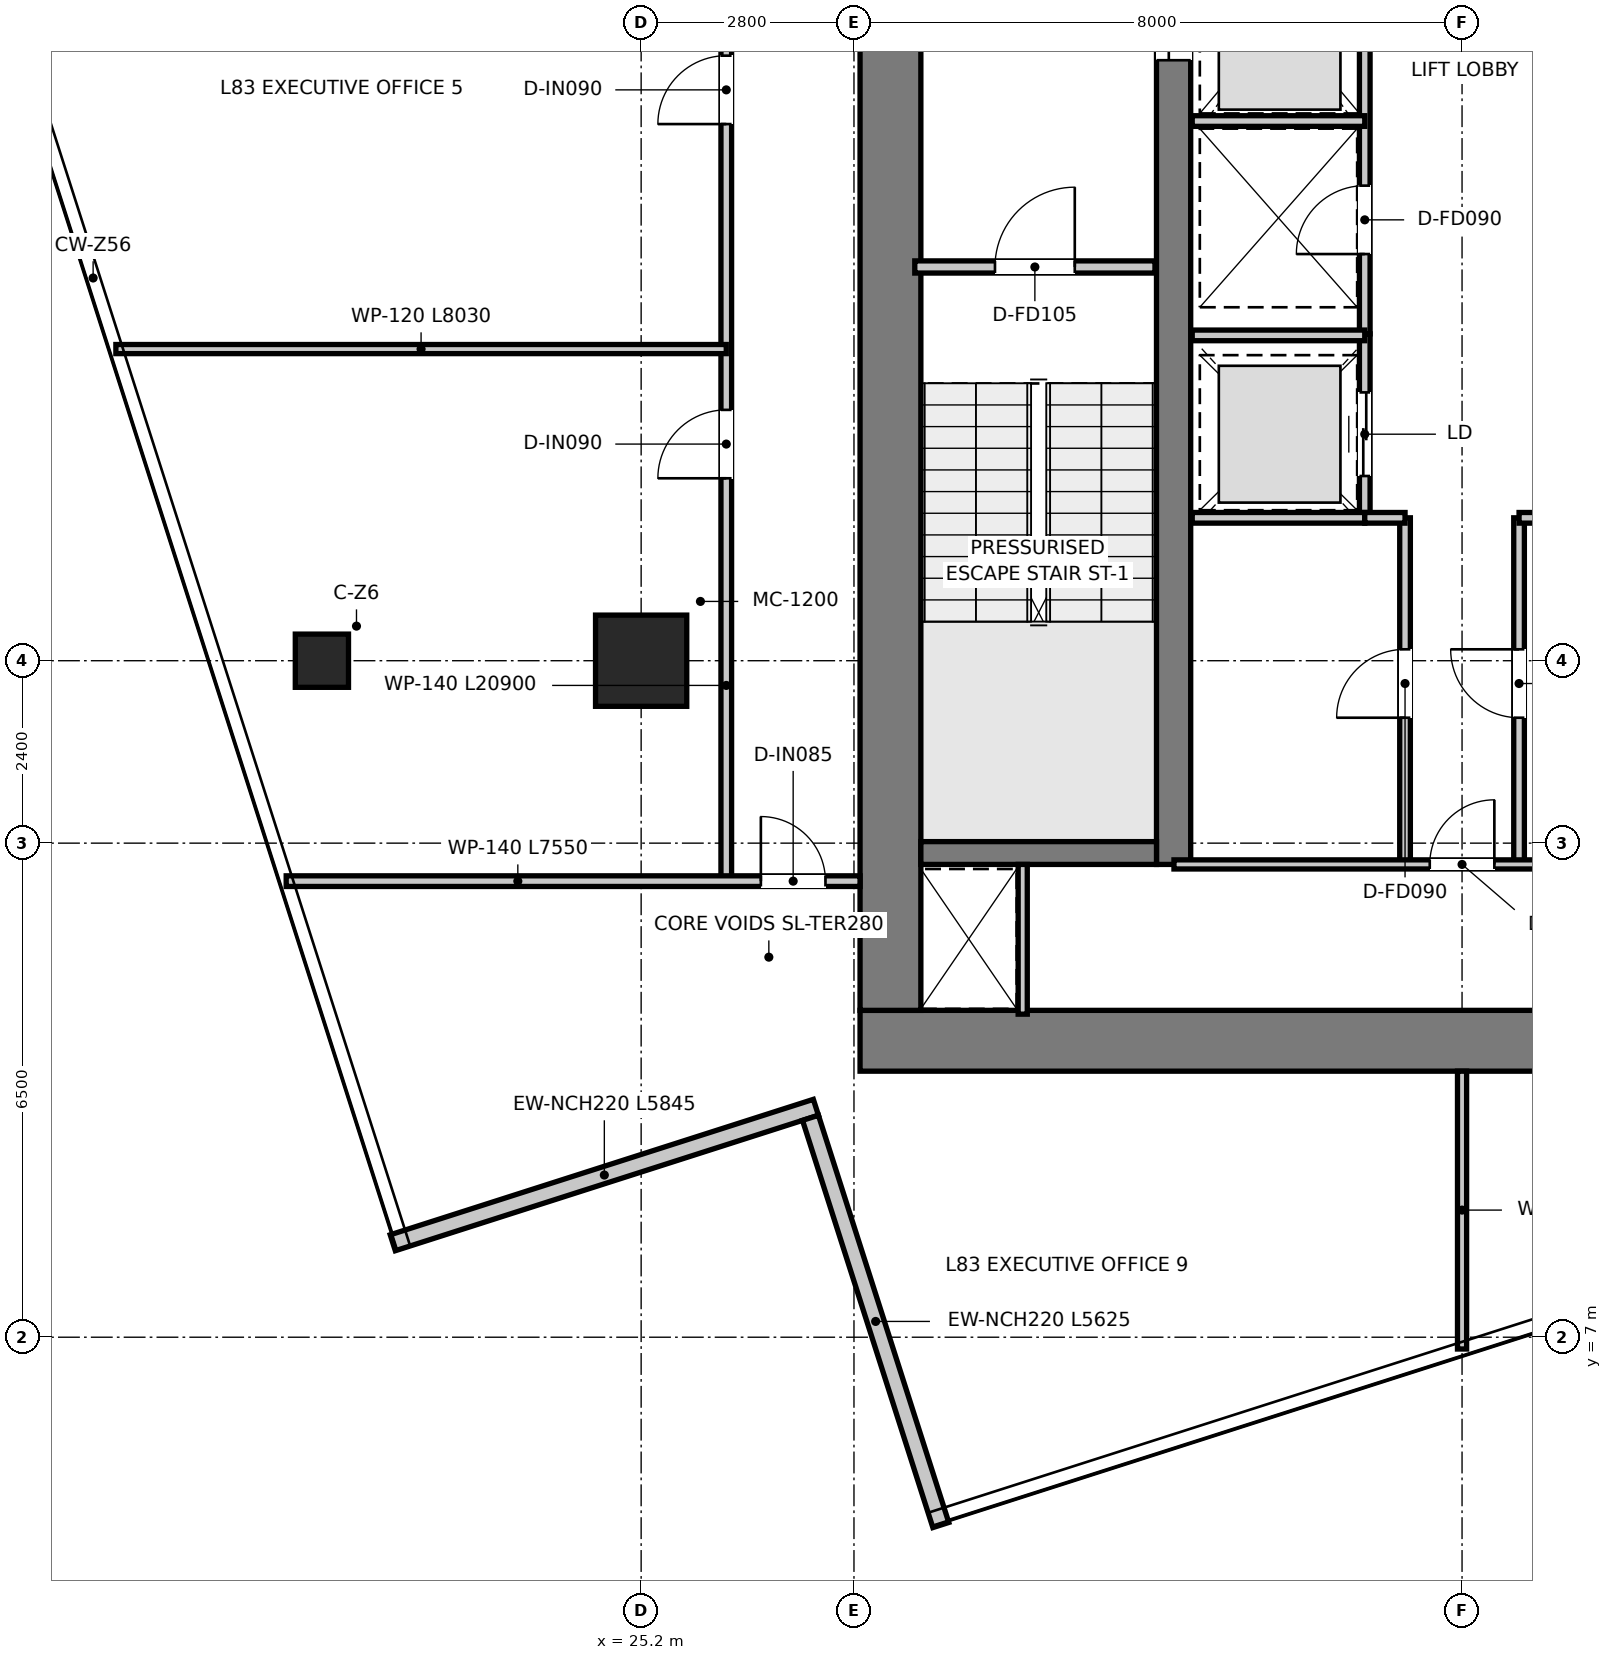
"""IFC4 building model, lengths in metres.
Left out: names, types, materials, properties, quantities, classifications, styles, units other than length and angle.
Written with IfcOpenShell. Run it as: python <this file> out.ifc"""

import sys

from ifc_helpers import new_model, si_unit, direction, frame, frame_2d, origin, origin_2d, place, context, subcontext, project, spatial, rectangle, extrude, source, transform, mapped, element, fill, save


model = new_model("IFC4")
c1 = context("Model", 3, precision=1e-05, world=origin(), true_north=direction((0.0, 1.0)))
c2 = subcontext(c1, "Body", "Model", "MODEL_VIEW")
j1 = project(units=[si_unit("LENGTHUNIT", "METRE"), si_unit("PLANEANGLEUNIT", "RADIAN")], contexts=[c1])
p1 = place(None, origin())
s1 = spatial("IfcSite", under=j1, at=p1, CompositionType="ELEMENT")
p2 = place(p1, origin())
s2 = spatial("IfcBuilding", under=s1, at=p2, CompositionType="ELEMENT")
p3 = place(p2, frame((0.0, 0.0, 339.55)))
s3 = spatial("IfcBuildingStorey", under=s2, at=p3, CompositionType="ELEMENT", Elevation=339.55)
p4 = place(p3, frame((28.08, 10.9, 0.0), z_axis=(0.0, 0.0, 1.0), x_axis=(1.0, 0.0, 0.0)))
e1 = element("IfcWall", 1, at=p4, inside=s3, PredefinedType="SHEAR", context=c2, shape_type="SweptSolid", body=[
    extrude(rectangle(XDim=15.84, YDim=0.8, at=frame_2d((7.92, 0.0))), origin(), (0.0, 0.0, 1.0), 3.95),
])
p5 = place(p3, frame((28.48, 11.3, 0.0), z_axis=(0.0, 0.0, 1.0), x_axis=(0.0, 1.0, 0.0)))
e2 = element("IfcWall", 2, at=p5, inside=s3, PredefinedType="SHEAR", context=c2, shape_type="SweptSolid", body=[
    extrude(rectangle(XDim=14.7, YDim=0.8, at=frame_2d((7.35, 0.0))), origin(), (0.0, 0.0, 1.0), 3.95),
])
p6 = place(p3, frame((32.205, 13.22, 0.0), z_axis=(0.0, 0.0, 1.0), x_axis=(0.0, 1.0, 0.0)))
e3 = element("IfcWall", 3, at=p6, inside=s3, PredefinedType="SHEAR", context=c2, shape_type="SweptSolid", body=[
    extrude(rectangle(XDim=12.78, YDim=0.45, at=frame_2d((6.39, 0.0))), origin(), (0.0, 0.0, 1.0), 3.95),
])
p7 = place(p6, frame((10.58, 0.0, 0.0)))
e4 = element("IfcOpeningElement", 4, at=p7, cuts=e3, PredefinedType="OPENING", context=c2, shape_type="SweptSolid", body=[
    extrude(rectangle(XDim=1.1, YDim=2.15, at=frame_2d((0.55, 1.075))), frame((0.0, 0.235, 0.0), z_axis=(0.0, -1.0, 0.0), x_axis=(1.0, 0.0, 0.0)), (0.0, 0.0, 1.0), 0.47),
])
p8 = place(p3, frame((28.88, 13.37, 0.0), z_axis=(0.0, 0.0, 1.0), x_axis=(1.0, 0.0, 0.0)))
e5 = element("IfcWall", 5, at=p8, inside=s3, PredefinedType="SHEAR", context=c2, shape_type="SweptSolid", body=[
    extrude(rectangle(XDim=3.1, YDim=0.3, at=frame_2d((1.55, 0.0))), origin(), (0.0, 0.0, 1.0), 3.95),
])
m1 = source(origin(), c2, "Body", "SweptSolid", [
    extrude(rectangle(XDim=1.2, YDim=1.2, at=origin_2d()), origin(), (0.0, 0.0, 1.0), 3.95),
])
p9 = place(p3, frame((25.2, 15.9, 0.0), z_axis=(0.0, 0.0, 1.0), x_axis=(1.0, 0.0, 0.0)))
e6 = element("IfcColumn", 6, at=p9, inside=s3, PredefinedType="USERDEFINED", context=c2, shape_type="MappedRepresentation", body=[
    mapped(m1, transform((0.0, 0.0, 0.0), x_axis=(1.0, 0.0, 0.0), y_axis=(0.0, 1.0, 0.0), z_axis=(0.0, 0.0, 1.0), scale=1.0)),
])
m2 = source(origin(), c2, "Body", "SweptSolid", [
    extrude(rectangle(XDim=0.7, YDim=0.7, at=origin_2d()), origin(), (0.0, 0.0, 1.0), 3.95),
])
p10 = place(p3, frame((21.0, 15.9, 0.0), z_axis=(0.0, 0.0, 1.0), x_axis=(1.0, 0.0, 0.0)))
e7 = element("IfcColumn", 7, at=p10, inside=s3, PredefinedType="COLUMN", context=c2, shape_type="MappedRepresentation", body=[
    mapped(m2, transform((0.0, 0.0, 0.0), x_axis=(1.0, 0.0, 0.0), y_axis=(0.0, 1.0, 0.0), z_axis=(0.0, 0.0, 1.0), scale=1.0)),
])
p11 = place(p3, frame((21.932, 8.243, 0.0), z_axis=(0.0, 0.0, 1.0), x_axis=(0.952391647481, 0.304877270074, 0.0)))
e8 = element("IfcWall", 8, at=p11, inside=s3, PredefinedType="ELEMENTEDWALL", context=c2, shape_type="SweptSolid", body=[
    extrude(rectangle(XDim=5.845, YDim=0.22, at=frame_2d((2.922, 0.0))), origin(), (0.0, 0.0, 1.0), 3.67),
])
p12 = place(p3, frame((27.428, 9.886, 0.0), z_axis=(0.0, 0.0, 1.0), x_axis=(0.304903286447, -0.952383318792, 0.0)))
e9 = element("IfcWall", 9, at=p12, inside=s3, PredefinedType="ELEMENTEDWALL", context=c2, shape_type="SweptSolid", body=[
    extrude(rectangle(XDim=5.625, YDim=0.22, at=frame_2d((2.812, 0.0))), origin(), (0.0, 0.0, 1.0), 3.67),
])
p13 = place(p3, frame((28.8, 21.08, 0.0), z_axis=(0.0, 0.0, 1.0), x_axis=(1.0, 0.0, 0.0)))
e10 = element("IfcWall", 10, at=p13, inside=s3, PredefinedType="PARTITIONING", context=c2, shape_type="SweptSolid", body=[
    extrude(rectangle(XDim=3.16, YDim=0.16, at=frame_2d((1.58, 0.0))), origin(), (0.0, 0.0, 1.0), 3.67),
])
p14 = place(p13, frame((1.055, 0.0, 0.0)))
e11 = element("IfcOpeningElement", 11, at=p14, cuts=e10, PredefinedType="OPENING", context=c2, shape_type="SweptSolid", body=[
    extrude(rectangle(XDim=1.05, YDim=2.1, at=frame_2d((0.525, 1.05))), frame((0.0, 0.09, 0.0), z_axis=(0.0, -1.0, 0.0), x_axis=(1.0, 0.0, 0.0)), (0.0, 0.0, 1.0), 0.18),
])
p15 = place(p3, frame((34.72, 20.2, 0.0), z_axis=(0.0, 0.0, 1.0), x_axis=(0.0, 1.0, 0.0)))
e12 = element("IfcWall", 12, at=p15, inside=s3, PredefinedType="PARTITIONING", context=c2, shape_type="SweptSolid", body=[
    extrude(rectangle(XDim=5.78, YDim=0.14, at=frame_2d((2.89, 0.0))), origin(), (0.0, 0.0, 1.0), 2.82),
])
p16 = place(p15, frame((1.05, 0.0, 0.0)))
e13 = element("IfcOpeningElement", 13, at=p16, cuts=e12, PredefinedType="OPENING", context=c2, shape_type="SweptSolid", body=[
    extrude(rectangle(XDim=0.9, YDim=2.1, at=frame_2d((0.45, 1.05))), frame((0.0, 0.08, 0.0), z_axis=(0.0, -1.0, 0.0), x_axis=(1.0, 0.0, 0.0)), (0.0, 0.0, 1.0), 0.16),
])
p17 = place(p3, frame((32.45, 23.0, 0.0), z_axis=(0.0, 0.0, 1.0), x_axis=(1.0, 0.0, 0.0)))
e14 = element("IfcWall", 14, at=p17, inside=s3, PredefinedType="PARTITIONING", context=c2, shape_type="SweptSolid", body=[
    extrude(rectangle(XDim=2.27, YDim=0.14, at=frame_2d((1.135, 0.0))), origin(), (0.0, 0.0, 1.0), 2.82),
])
p18 = place(p3, frame((34.72, 17.78, 0.0), z_axis=(0.0, 0.0, 1.0), x_axis=(0.0, 1.0, 0.0)))
e15 = element("IfcWall", 15, at=p18, inside=s3, PredefinedType="PARTITIONING", context=c2, shape_type="SweptSolid", body=[
    extrude(rectangle(XDim=2.42, YDim=0.14, at=frame_2d((1.21, 0.0))), origin(), (0.0, 0.0, 1.0), 3.67),
])
p19 = place(p18, frame((0.55, 0.0, 0.0)))
e16 = element("IfcOpeningElement", 16, at=p19, cuts=e15, PredefinedType="OPENING", context=c2, shape_type="SweptSolid", body=[
    extrude(rectangle(XDim=1.1, YDim=2.15, at=frame_2d((0.55, 1.075))), frame((0.0, 0.08, 0.0), z_axis=(0.0, -1.0, 0.0), x_axis=(1.0, 0.0, 0.0)), (0.0, 0.0, 1.0), 0.16),
])
for number, where, z_axis, x_axis in (
    (17, (32.45, 17.78, 0.0), (0.0, 0.0, 1.0), (1.0, 0.0, 0.0)),
    (18, (32.45, 20.18, 0.0), (0.0, 0.0, 1.0), (1.0, 0.0, 0.0)),
):
    element("IfcWall", number, at=place(p3, frame(where, z_axis=z_axis, x_axis=x_axis)), inside=s3, PredefinedType="PARTITIONING", context=c2, shape_type="SweptSolid", body=[
        extrude(rectangle(XDim=2.27, YDim=0.14, at=frame_2d((1.135, 0.0))), origin(), (0.0, 0.0, 1.0), 3.67),
    ])
p20 = place(p3, frame((35.25, 13.22, 0.0), z_axis=(0.0, 0.0, 1.0), x_axis=(0.0, 1.0, 0.0)))
e19 = element("IfcWall", 19, at=p20, inside=s3, PredefinedType="PARTITIONING", context=c2, shape_type="SweptSolid", body=[
    extrude(rectangle(XDim=4.56, YDim=0.14, at=frame_2d((2.28, 0.0))), origin(), (0.0, 0.0, 1.0), 3.67),
])
p21 = place(p20, frame((1.93, 0.0, 0.0)))
e20 = element("IfcOpeningElement", 20, at=p21, cuts=e19, PredefinedType="OPENING", context=c2, shape_type="SweptSolid", body=[
    extrude(rectangle(XDim=0.9, YDim=2.1, at=frame_2d((0.45, 1.05))), frame((0.0, 0.08, 0.0), z_axis=(0.0, -1.0, 0.0), x_axis=(1.0, 0.0, 0.0)), (0.0, 0.0, 1.0), 0.16),
])
p22 = place(p3, frame((34.72, 17.78, 0.0), z_axis=(0.0, 0.0, 1.0), x_axis=(1.0, 0.0, 0.0)))
e21 = element("IfcWall", 21, at=p22, inside=s3, PredefinedType="PARTITIONING", context=c2, shape_type="SweptSolid", body=[
    extrude(rectangle(XDim=0.53, YDim=0.14, at=frame_2d((0.265, 0.0))), origin(), (0.0, 0.0, 1.0), 3.67),
])
p23 = place(p3, frame((36.75, 13.22, 0.0), z_axis=(0.0, 0.0, 1.0), x_axis=(0.0, 1.0, 0.0)))
e22 = element("IfcWall", 22, at=p23, inside=s3, PredefinedType="PARTITIONING", context=c2, shape_type="SweptSolid", body=[
    extrude(rectangle(XDim=4.56, YDim=0.14, at=frame_2d((2.28, 0.0))), origin(), (0.0, 0.0, 1.0), 3.67),
])
p24 = place(p23, frame((1.93, 0.0, 0.0)))
e23 = element("IfcOpeningElement", 23, at=p24, cuts=e22, PredefinedType="OPENING", context=c2, shape_type="SweptSolid", body=[
    extrude(rectangle(XDim=0.9, YDim=2.1, at=frame_2d((0.45, 1.05))), frame((0.0, 0.08, 0.0), z_axis=(0.0, -1.0, 0.0), x_axis=(1.0, 0.0, 0.0)), (0.0, 0.0, 1.0), 0.16),
])
p25 = place(p3, frame((36.75, 17.78, 0.0), z_axis=(0.0, 0.0, 1.0), x_axis=(1.0, 0.0, 0.0)))
e24 = element("IfcWall", 24, at=p25, inside=s3, PredefinedType="PARTITIONING", context=c2, shape_type="SweptSolid", body=[
    extrude(rectangle(XDim=0.53, YDim=0.14, at=frame_2d((0.265, 0.0))), origin(), (0.0, 0.0, 1.0), 3.67),
])
p26 = place(p3, frame((30.22, 11.25, 0.0), z_axis=(0.0, 0.0, 1.0), x_axis=(0.0, 1.0, 0.0)))
e25 = element("IfcWall", 25, at=p26, inside=s3, PredefinedType="PARTITIONING", context=c2, shape_type="SweptSolid", body=[
    extrude(rectangle(XDim=1.97, YDim=0.12, at=frame_2d((0.985, 0.0))), origin(), (0.0, 0.0, 1.0), 3.67),
])
p27 = place(p3, frame((32.21, 13.22, 0.0), z_axis=(0.0, 0.0, 1.0), x_axis=(1.0, 0.0, 0.0)))
e26 = element("IfcWall", 26, at=p27, inside=s3, PredefinedType="PARTITIONING", context=c2, shape_type="SweptSolid", body=[
    extrude(rectangle(XDim=7.58, YDim=0.12, at=frame_2d((3.79, 0.0))), origin(), (0.0, 0.0, 1.0), 3.67),
])
p28 = place(p27, frame((3.365, 0.0, 0.0)))
e27 = element("IfcOpeningElement", 27, at=p28, cuts=e26, PredefinedType="OPENING", context=c2, shape_type="SweptSolid", body=[
    extrude(rectangle(XDim=0.85, YDim=2.1, at=frame_2d((0.425, 1.05))), frame((0.0, 0.07, 0.0), z_axis=(0.0, -1.0, 0.0), x_axis=(1.0, 0.0, 0.0)), (0.0, 0.0, 1.0), 0.14),
])
p29 = place(p3, frame((26.32, 13.0, 0.0), z_axis=(0.0, 0.0, 1.0), x_axis=(0.0, 1.0, 0.0)))
e28 = element("IfcWall", 28, at=p29, inside=s3, PredefinedType="PARTITIONING", context=c2, shape_type="SweptSolid", body=[
    extrude(rectangle(XDim=15.66, YDim=0.14, at=frame_2d((7.83, 0.0))), origin(), (0.0, 0.0, 1.0), 3.13),
])
p30 = place(p29, frame((14.3, 0.0, 0.0)))
e29 = element("IfcOpeningElement", 29, at=p30, cuts=e28, PredefinedType="OPENING", context=c2, shape_type="SweptSolid", body=[
    extrude(rectangle(XDim=0.9, YDim=2.1, at=frame_2d((0.45, 1.05))), frame((0.0, 0.08, 0.0), z_axis=(0.0, -1.0, 0.0), x_axis=(1.0, 0.0, 0.0)), (0.0, 0.0, 1.0), 0.16),
])
p31 = place(p29, frame((5.3, 0.0, 0.0)))
e30 = element("IfcOpeningElement", 30, at=p31, cuts=e28, PredefinedType="OPENING", context=c2, shape_type="SweptSolid", body=[
    extrude(rectangle(XDim=0.9, YDim=2.1, at=frame_2d((0.45, 1.05))), frame((0.0, 0.08, 0.0), z_axis=(0.0, -1.0, 0.0), x_axis=(1.0, 0.0, 0.0)), (0.0, 0.0, 1.0), 0.16),
])
p32 = place(p29, frame((9.96, 0.0, 0.0)))
e31 = element("IfcOpeningElement", 31, at=p32, cuts=e28, PredefinedType="OPENING", context=c2, shape_type="SweptSolid", body=[
    extrude(rectangle(XDim=0.9, YDim=2.1, at=frame_2d((0.45, 1.05))), frame((0.0, 0.08, 0.0), z_axis=(0.0, -1.0, 0.0), x_axis=(1.0, 0.0, 0.0)), (0.0, 0.0, 1.0), 0.16),
])
p33 = place(p3, frame((20.53, 13.0, 0.0), z_axis=(0.0, 0.0, 1.0), x_axis=(1.0, 0.0, 0.0)))
e32 = element("IfcWall", 32, at=p33, inside=s3, PredefinedType="PARTITIONING", context=c2, shape_type="SweptSolid", body=[
    extrude(rectangle(XDim=7.55, YDim=0.14, at=frame_2d((3.775, 0.0))), origin(), (0.0, 0.0, 1.0), 3.18),
])
p34 = place(p33, frame((6.245, 0.0, 0.0)))
e33 = element("IfcOpeningElement", 33, at=p34, cuts=e32, PredefinedType="OPENING", context=c2, shape_type="SweptSolid", body=[
    extrude(rectangle(XDim=0.85, YDim=2.1, at=frame_2d((0.425, 1.05))), frame((0.0, 0.08, 0.0), z_axis=(0.0, -1.0, 0.0), x_axis=(1.0, 0.0, 0.0)), (0.0, 0.0, 1.0), 0.16),
])
p35 = place(p3, frame((18.29, 20.0, 0.0), z_axis=(0.0, 0.0, 1.0), x_axis=(1.0, 0.0, 0.0)))
e34 = element("IfcWall", 34, at=p35, inside=s3, PredefinedType="PARTITIONING", context=c2, shape_type="SweptSolid", body=[
    extrude(rectangle(XDim=8.031, YDim=0.12, at=frame_2d((4.015, 0.0))), origin(), (0.0, 0.0, 1.0), 3.13),
])
p36 = place(p3, frame((36.0, 6.845, 0.0), z_axis=(0.0, 0.0, 1.0), x_axis=(0.0, 1.0, 0.0)))
e35 = element("IfcWall", 35, at=p36, inside=s3, PredefinedType="PARTITIONING", context=c2, shape_type="SweptSolid", body=[
    extrude(rectangle(XDim=3.655, YDim=0.12, at=frame_2d((1.828, 0.0))), origin(), (0.0, 0.0, 1.0), 3.67),
])
p37 = place(p14, origin())
e36 = element("IfcDoor", 36, at=p37, inside=s3, OperationType="SINGLE_SWING_RIGHT", PredefinedType="DOOR", context=c2, shape_type="SweptSolid", body=[
    extrude(rectangle(XDim=1.05, YDim=2.1, at=frame_2d((0.525, 1.05))), frame((0.0, 0.025, 0.0), z_axis=(0.0, -1.0, 0.0), x_axis=(1.0, 0.0, 0.0)), (0.0, 0.0, 1.0), 0.05),
])
fill(e11, e36)
p38 = place(p7, origin())
e37 = element("IfcDoor", 37, at=p38, inside=s3, OperationType="DOUBLE_DOOR_SLIDING", PredefinedType="DOOR", context=c2, shape_type="SweptSolid", body=[
    extrude(rectangle(XDim=1.1, YDim=2.15, at=frame_2d((0.55, 1.075))), frame((0.0, 0.025, 0.0), z_axis=(0.0, -1.0, 0.0), x_axis=(1.0, 0.0, 0.0)), (0.0, 0.0, 1.0), 0.05),
])
fill(e4, e37)
p39 = place(p16, origin())
e38 = element("IfcDoor", 38, at=p39, inside=s3, OperationType="SINGLE_SWING_LEFT", PredefinedType="DOOR", context=c2, shape_type="SweptSolid", body=[
    extrude(rectangle(XDim=0.9, YDim=2.1, at=frame_2d((0.45, 1.05))), frame((0.0, 0.025, 0.0), z_axis=(0.0, -1.0, 0.0), x_axis=(1.0, 0.0, 0.0)), (0.0, 0.0, 1.0), 0.05),
])
fill(e13, e38)
p40 = place(p19, origin())
e39 = element("IfcDoor", 39, at=p40, inside=s3, OperationType="DOUBLE_DOOR_SLIDING", PredefinedType="DOOR", context=c2, shape_type="SweptSolid", body=[
    extrude(rectangle(XDim=1.1, YDim=2.15, at=frame_2d((0.55, 1.075))), frame((0.0, 0.025, 0.0), z_axis=(0.0, -1.0, 0.0), x_axis=(1.0, 0.0, 0.0)), (0.0, 0.0, 1.0), 0.05),
])
fill(e16, e39)
p41 = place(p21, origin())
e40 = element("IfcDoor", 40, at=p41, inside=s3, OperationType="SINGLE_SWING_LEFT", PredefinedType="DOOR", context=c2, shape_type="SweptSolid", body=[
    extrude(rectangle(XDim=0.9, YDim=2.1, at=frame_2d((0.45, 1.05))), frame((0.0, 0.025, 0.0), z_axis=(0.0, -1.0, 0.0), x_axis=(1.0, 0.0, 0.0)), (0.0, 0.0, 1.0), 0.05),
])
fill(e20, e40)
p42 = place(p24, origin())
e41 = element("IfcDoor", 41, at=p42, inside=s3, OperationType="SINGLE_SWING_RIGHT", PredefinedType="DOOR", context=c2, shape_type="SweptSolid", body=[
    extrude(rectangle(XDim=0.9, YDim=2.1, at=frame_2d((0.45, 1.05))), frame((0.0, 0.025, 0.0), z_axis=(0.0, -1.0, 0.0), x_axis=(1.0, 0.0, 0.0)), (0.0, 0.0, 1.0), 0.05),
])
fill(e23, e41)
p43 = place(p28, origin())
e42 = element("IfcDoor", 42, at=p43, inside=s3, OperationType="SINGLE_SWING_RIGHT", PredefinedType="DOOR", context=c2, shape_type="SweptSolid", body=[
    extrude(rectangle(XDim=0.85, YDim=2.1, at=frame_2d((0.425, 1.05))), frame((0.0, 0.025, 0.0), z_axis=(0.0, -1.0, 0.0), x_axis=(1.0, 0.0, 0.0)), (0.0, 0.0, 1.0), 0.05),
])
fill(e27, e42)
p44 = place(p31, origin())
e43 = element("IfcDoor", 43, at=p44, inside=s3, OperationType="SINGLE_SWING_LEFT", PredefinedType="DOOR", context=c2, shape_type="SweptSolid", body=[
    extrude(rectangle(XDim=0.9, YDim=2.1, at=frame_2d((0.45, 1.05))), frame((0.0, 0.025, 0.0), z_axis=(0.0, -1.0, 0.0), x_axis=(1.0, 0.0, 0.0)), (0.0, 0.0, 1.0), 0.05),
])
fill(e30, e43)
p45 = place(p32, origin())
e44 = element("IfcDoor", 44, at=p45, inside=s3, OperationType="SINGLE_SWING_LEFT", PredefinedType="DOOR", context=c2, shape_type="SweptSolid", body=[
    extrude(rectangle(XDim=0.9, YDim=2.1, at=frame_2d((0.45, 1.05))), frame((0.0, 0.025, 0.0), z_axis=(0.0, -1.0, 0.0), x_axis=(1.0, 0.0, 0.0)), (0.0, 0.0, 1.0), 0.05),
])
fill(e31, e44)
p46 = place(p34, origin())
e45 = element("IfcDoor", 45, at=p46, inside=s3, OperationType="SINGLE_SWING_LEFT", PredefinedType="DOOR", context=c2, shape_type="SweptSolid", body=[
    extrude(rectangle(XDim=0.85, YDim=2.1, at=frame_2d((0.425, 1.05))), frame((0.0, 0.025, 0.0), z_axis=(0.0, -1.0, 0.0), x_axis=(1.0, 0.0, 0.0)), (0.0, 0.0, 1.0), 0.05),
])
fill(e33, e45)
save(model, sys.argv[1])
